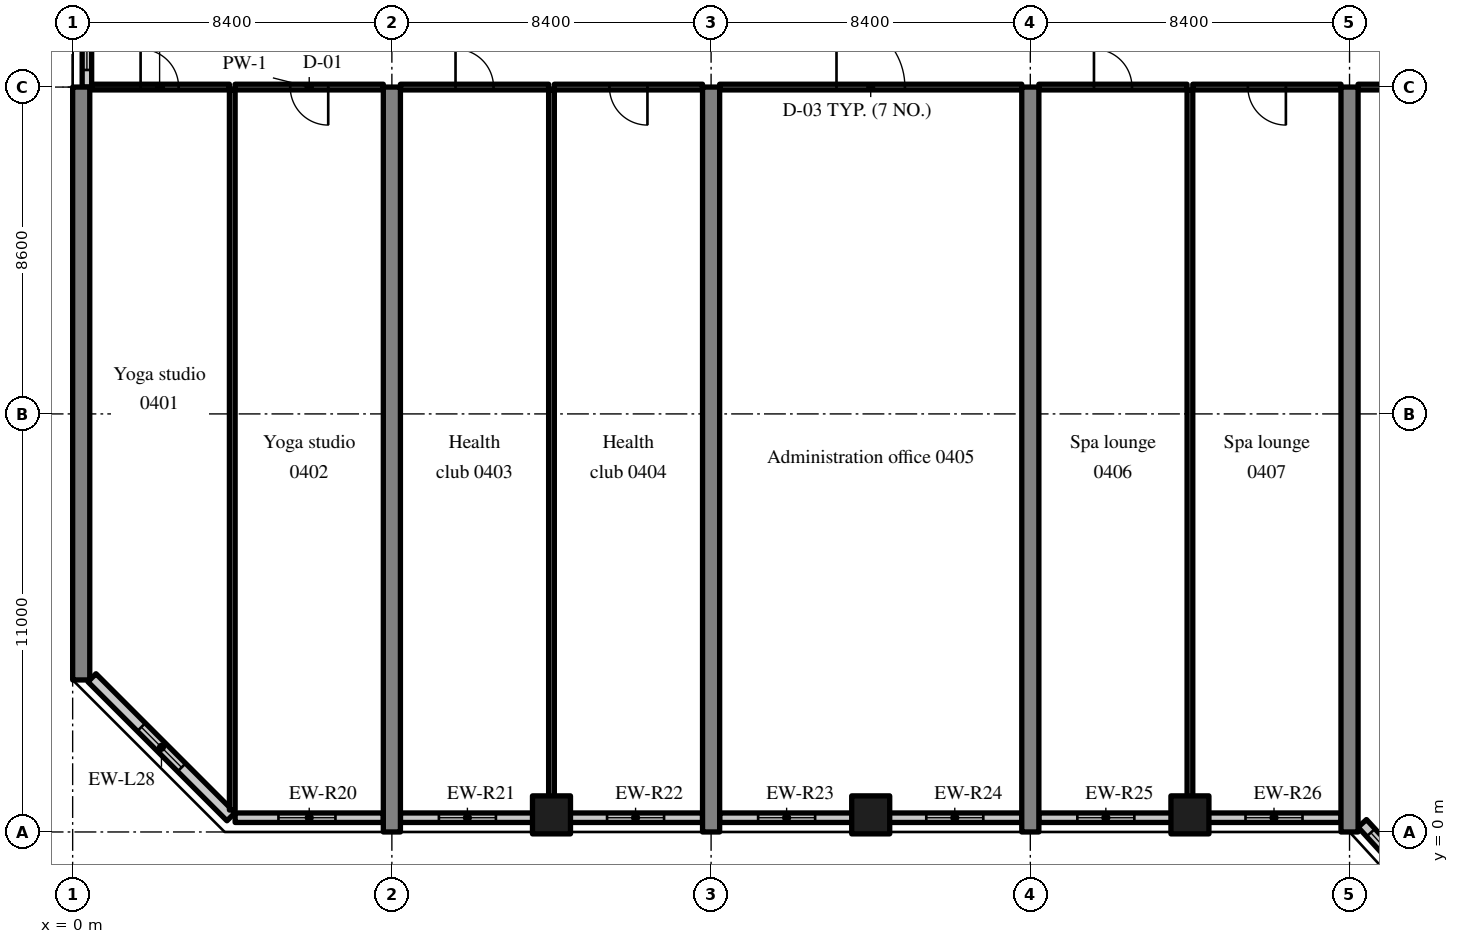
"""IFC4 building model, lengths in metres.
Left out: names, types, materials, properties, quantities, classifications, styles, units other than length and angle.
Written with IfcOpenShell. Run it as: python <this file> out.ifc"""

import sys

from ifc_helpers import new_model, si_unit, direction, frame, frame_2d, origin, origin_2d, place, context, subcontext, project, spatial, rectangle, extrude, source, transform, mapped, element, fill, save


model = new_model("IFC4")
c1 = context("Model", 3, precision=1e-05, world=origin(), true_north=direction((0.0, 1.0)))
c2 = subcontext(c1, "Body", "Model", "MODEL_VIEW")
j1 = project(units=[si_unit("LENGTHUNIT", "METRE"), si_unit("PLANEANGLEUNIT", "RADIAN")], contexts=[c1])
p1 = place(None, origin())
s1 = spatial("IfcSite", under=j1, at=p1, CompositionType="ELEMENT")
p2 = place(p1, origin())
s2 = spatial("IfcBuilding", under=s1, at=p2, CompositionType="ELEMENT")
p3 = place(p2, frame((0.0, 0.0, 23.0)))
s3 = spatial("IfcBuildingStorey", under=s2, at=p3, CompositionType="ELEMENT", Elevation=23.0)
m1 = source(origin(), c2, "Body", "SweptSolid", [
    extrude(rectangle(XDim=15.6, YDim=0.45, at=frame_2d((7.8, 0.0))), origin(), (0.0, 0.0, 1.0), 4.52),
])
p4 = place(p3, frame((0.225, 4.0, 0.0), z_axis=(0.0, 0.0, 1.0), x_axis=(0.0, 1.0, 0.0)))
e1 = element("IfcWall", 1, at=p4, inside=s3, PredefinedType="SHEAR", context=c2, shape_type="MappedRepresentation", body=[
    mapped(m1, transform((0.0, 0.0, 0.0), scale=1.0)),
])
m2 = source(origin(), c2, "Body", "SweptSolid", [
    extrude(rectangle(XDim=19.6, YDim=0.45, at=frame_2d((9.8, 0.0))), origin(), (0.0, 0.0, 1.0), 4.52),
])
for number, where, z_axis, x_axis in (
    (2, (8.4, 0.0, 0.0), (0.0, 0.0, 1.0), (0.0, 1.0, 0.0)),
    (3, (16.8, 0.0, 0.0), (0.0, 0.0, 1.0), (0.0, 1.0, 0.0)),
    (4, (25.2, 0.0, 0.0), (0.0, 0.0, 1.0), (0.0, 1.0, 0.0)),
    (5, (33.6, 0.0, 0.0), (0.0, 0.0, 1.0), (0.0, 1.0, 0.0)),
):
    element("IfcWall", number, at=place(p3, frame(where, z_axis=z_axis, x_axis=x_axis)), inside=s3, PredefinedType="SHEAR", context=c2, shape_type="MappedRepresentation", body=[
        mapped(m2, transform((0.0, 0.0, 0.0), scale=1.0)),
    ])
m3 = source(origin(), c2, "Body", "SweptSolid", [
    extrude(rectangle(XDim=1.0, YDim=1.0, at=origin_2d()), origin(), (0.0, 0.0, 1.0), 4.52),
])
for number, where, z_axis, x_axis in (
    (6, (12.6, 0.45, 0.0), (0.0, 0.0, 1.0), (1.0, 0.0, 0.0)),
    (7, (21.0, 0.45, 0.0), (0.0, 0.0, 1.0), (1.0, 0.0, 0.0)),
    (8, (29.4, 0.45, 0.0), (0.0, 0.0, 1.0), (1.0, 0.0, 0.0)),
):
    element("IfcColumn", number, at=place(p3, frame(where, z_axis=z_axis, x_axis=x_axis)), inside=s3, PredefinedType="COLUMN", context=c2, shape_type="MappedRepresentation", body=[
        mapped(m3, transform((0.0, 0.0, 0.0), scale=1.0)),
    ])
m4 = source(origin(), c2, "Body", "SweptSolid", [
    extrude(rectangle(XDim=2.4, YDim=0.25, at=frame_2d((1.2, 0.0))), origin(), (0.0, 0.0, 1.0), 3.62),
])
p5 = place(p3, frame((0.375, 22.0, 0.0), z_axis=(0.0, 0.0, 1.0), x_axis=(0.0, -1.0, 0.0)))
e9 = element("IfcWall", 9, at=p5, inside=s3, PredefinedType="SOLIDWALL", context=c2, shape_type="MappedRepresentation", body=[
    mapped(m4, transform((0.0, 0.0, 0.0), scale=1.0)),
])
m5 = source(origin(), c2, "Body", "SweptSolid", [
    extrude(rectangle(XDim=1.5, YDim=1.5, at=frame_2d((0.75, 0.75))), frame((0.0, 0.135, 0.0), z_axis=(0.0, -1.0, 0.0), x_axis=(1.0, 0.0, 0.0)), (0.0, 0.0, 1.0), 0.27),
])
p6 = place(p5, frame((0.45, 0.0, 0.9)))
e10 = element("IfcOpeningElement", 10, at=p6, cuts=e9, PredefinedType="OPENING", context=c2, shape_type="MappedRepresentation", body=[
    mapped(m5, transform((0.0, 0.0, 0.0), scale=1.0)),
])
m6 = source(origin(), c2, "Body", "SweptSolid", [
    extrude(rectangle(XDim=5.173, YDim=0.3, at=frame_2d((2.586, 0.0))), origin(), (0.0, 0.0, 1.0), 3.77),
])
p7 = place(p3, frame((0.508, 4.058, 0.0), z_axis=(0.0, 0.0, 1.0), x_axis=(0.707106781187, -0.707106781187, 0.0)))
e11 = element("IfcWall", 11, at=p7, inside=s3, PredefinedType="SOLIDWALL", context=c2, shape_type="MappedRepresentation", body=[
    mapped(m6, transform((0.0, 0.0, 0.0), scale=1.0)),
])
m7 = source(origin(), c2, "Body", "SweptSolid", [
    extrude(rectangle(XDim=1.5, YDim=1.5, at=frame_2d((0.75, 0.75))), frame((0.0, 0.16, 0.0), z_axis=(0.0, -1.0, 0.0), x_axis=(1.0, 0.0, 0.0)), (0.0, 0.0, 1.0), 0.32),
])
p8 = place(p7, frame((1.836, 0.0, 0.9)))
e12 = element("IfcOpeningElement", 12, at=p8, cuts=e11, PredefinedType="OPENING", context=c2, shape_type="MappedRepresentation", body=[
    mapped(m7, transform((0.0, 0.0, 0.0), scale=1.0)),
])
m8 = source(origin(), c2, "Body", "SweptSolid", [
    extrude(rectangle(XDim=3.9, YDim=0.25, at=frame_2d((1.95, 0.0))), origin(), (0.0, 0.0, 1.0), 3.77),
])
p9 = place(p3, frame((4.275, 0.375, 0.0), z_axis=(0.0, 0.0, 1.0), x_axis=(1.0, 0.0, 0.0)))
e13 = element("IfcWall", 13, at=p9, inside=s3, PredefinedType="SOLIDWALL", context=c2, shape_type="MappedRepresentation", body=[
    mapped(m8, transform((0.0, 0.0, 0.0), scale=1.0)),
])
p10 = place(p9, frame((1.14, 0.0, 0.9)))
e14 = element("IfcOpeningElement", 14, at=p10, cuts=e13, PredefinedType="OPENING", context=c2, shape_type="MappedRepresentation", body=[
    mapped(m5, transform((0.0, 0.0, 0.0), scale=1.0)),
])
m9 = source(origin(), c2, "Body", "SweptSolid", [
    extrude(rectangle(XDim=3.525, YDim=0.25, at=frame_2d((1.762, 0.0))), origin(), (0.0, 0.0, 1.0), 3.77),
])
p11 = place(p3, frame((8.625, 0.375, 0.0), z_axis=(0.0, 0.0, 1.0), x_axis=(1.0, 0.0, 0.0)))
e15 = element("IfcWall", 15, at=p11, inside=s3, PredefinedType="SOLIDWALL", context=c2, shape_type="MappedRepresentation", body=[
    mapped(m9, transform((0.0, 0.0, 0.0), scale=1.0)),
])
p12 = place(p11, frame((1.012, 0.0, 0.9)))
e16 = element("IfcOpeningElement", 16, at=p12, cuts=e15, PredefinedType="OPENING", context=c2, shape_type="MappedRepresentation", body=[
    mapped(m5, transform((0.0, 0.0, 0.0), scale=1.0)),
])
p13 = place(p3, frame((13.05, 0.375, 0.0), z_axis=(0.0, 0.0, 1.0), x_axis=(1.0, 0.0, 0.0)))
e17 = element("IfcWall", 17, at=p13, inside=s3, PredefinedType="SOLIDWALL", context=c2, shape_type="MappedRepresentation", body=[
    mapped(m9, transform((0.0, 0.0, 0.0), scale=1.0)),
])
p14 = place(p13, frame((1.012, 0.0, 0.9)))
e18 = element("IfcOpeningElement", 18, at=p14, cuts=e17, PredefinedType="OPENING", context=c2, shape_type="MappedRepresentation", body=[
    mapped(m5, transform((0.0, 0.0, 0.0), scale=1.0)),
])
m10 = source(origin(), c2, "Body", "SweptSolid", [
    extrude(rectangle(XDim=3.525, YDim=0.25, at=frame_2d((1.763, 0.0))), origin(), (0.0, 0.0, 1.0), 3.77),
])
p15 = place(p3, frame((17.025, 0.375, 0.0), z_axis=(0.0, 0.0, 1.0), x_axis=(1.0, 0.0, 0.0)))
e19 = element("IfcWall", 19, at=p15, inside=s3, PredefinedType="SOLIDWALL", context=c2, shape_type="MappedRepresentation", body=[
    mapped(m10, transform((0.0, 0.0, 0.0), scale=1.0)),
])
p16 = place(p15, frame((1.012, 0.0, 0.9)))
e20 = element("IfcOpeningElement", 20, at=p16, cuts=e19, PredefinedType="OPENING", context=c2, shape_type="MappedRepresentation", body=[
    mapped(m5, transform((0.0, 0.0, 0.0), scale=1.0)),
])
p17 = place(p3, frame((21.45, 0.375, 0.0), z_axis=(0.0, 0.0, 1.0), x_axis=(1.0, 0.0, 0.0)))
e21 = element("IfcWall", 21, at=p17, inside=s3, PredefinedType="SOLIDWALL", context=c2, shape_type="MappedRepresentation", body=[
    mapped(m10, transform((0.0, 0.0, 0.0), scale=1.0)),
])
p18 = place(p17, frame((1.012, 0.0, 0.9)))
e22 = element("IfcOpeningElement", 22, at=p18, cuts=e21, PredefinedType="OPENING", context=c2, shape_type="MappedRepresentation", body=[
    mapped(m5, transform((0.0, 0.0, 0.0), scale=1.0)),
])
p19 = place(p3, frame((25.425, 0.375, 0.0), z_axis=(0.0, 0.0, 1.0), x_axis=(1.0, 0.0, 0.0)))
e23 = element("IfcWall", 23, at=p19, inside=s3, PredefinedType="SOLIDWALL", context=c2, shape_type="MappedRepresentation", body=[
    mapped(m9, transform((0.0, 0.0, 0.0), scale=1.0)),
])
p20 = place(p19, frame((1.012, 0.0, 0.9)))
e24 = element("IfcOpeningElement", 24, at=p20, cuts=e23, PredefinedType="OPENING", context=c2, shape_type="MappedRepresentation", body=[
    mapped(m5, transform((0.0, 0.0, 0.0), scale=1.0)),
])
p21 = place(p3, frame((29.85, 0.375, 0.0), z_axis=(0.0, 0.0, 1.0), x_axis=(1.0, 0.0, 0.0)))
e25 = element("IfcWall", 25, at=p21, inside=s3, PredefinedType="SOLIDWALL", context=c2, shape_type="MappedRepresentation", body=[
    mapped(m9, transform((0.0, 0.0, 0.0), scale=1.0)),
])
p22 = place(p21, frame((1.012, 0.0, 0.9)))
e26 = element("IfcOpeningElement", 26, at=p22, cuts=e25, PredefinedType="OPENING", context=c2, shape_type="MappedRepresentation", body=[
    mapped(m5, transform((0.0, 0.0, 0.0), scale=1.0)),
])
m11 = source(origin(), c2, "Body", "SweptSolid", [
    extrude(rectangle(XDim=2.162, YDim=0.3, at=frame_2d((1.081, 0.0))), origin(), (0.0, 0.0, 1.0), 4.52),
])
p23 = place(p3, frame((33.936, 0.226, 0.0), z_axis=(0.0, 0.0, 1.0), x_axis=(0.67537173084, -0.737477474355, 0.0)))
e27 = element("IfcWall", 27, at=p23, inside=s3, PredefinedType="SOLIDWALL", context=c2, shape_type="MappedRepresentation", body=[
    mapped(m11, transform((0.0, 0.0, 0.0), scale=1.0)),
])
m12 = source(origin(), c2, "Body", "SweptSolid", [
    extrude(rectangle(XDim=1.5, YDim=2.0, at=frame_2d((0.75, 1.0))), frame((0.0, 0.16, 0.0), z_axis=(0.0, -1.0, 0.0), x_axis=(1.0, 0.0, 0.0)), (0.0, 0.0, 1.0), 0.32),
])
p24 = place(p23, frame((0.331, 0.0, 0.9)))
e28 = element("IfcOpeningElement", 28, at=p24, cuts=e27, PredefinedType="OPENING", context=c2, shape_type="MappedRepresentation", body=[
    mapped(m12, transform((0.0, 0.0, 0.0), scale=1.0)),
])
m13 = source(origin(), c2, "Body", "SweptSolid", [
    extrude(rectangle(XDim=3.625, YDim=0.15, at=frame_2d((1.812, 0.0))), origin(), (0.0, 0.0, 1.0), 3.82),
])
p25 = place(p3, frame((0.5, 19.6, 0.0), z_axis=(0.0, 0.0, 1.0), x_axis=(1.0, 0.0, 0.0)))
e29 = element("IfcWall", 29, at=p25, inside=s3, PredefinedType="PARTITIONING", context=c2, shape_type="MappedRepresentation", body=[
    mapped(m13, transform((0.0, 0.0, 0.0), scale=1.0)),
])
m14 = source(origin(), c2, "Body", "SweptSolid", [
    extrude(rectangle(XDim=1.0, YDim=2.1, at=frame_2d((0.5, 1.05))), frame((0.0, 0.085, 0.0), z_axis=(0.0, -1.0, 0.0), x_axis=(1.0, 0.0, 0.0)), (0.0, 0.0, 1.0), 0.17),
])
p26 = place(p25, frame((1.288, 0.0, 0.0)))
e30 = element("IfcOpeningElement", 30, at=p26, cuts=e29, PredefinedType="OPENING", context=c2, shape_type="MappedRepresentation", body=[
    mapped(m14, transform((0.0, 0.0, 0.0), scale=1.0)),
])
m15 = source(origin(), c2, "Body", "SweptSolid", [
    extrude(rectangle(XDim=3.9, YDim=0.15, at=frame_2d((1.95, 0.0))), origin(), (0.0, 0.0, 1.0), 3.82),
])
p27 = place(p3, frame((4.275, 19.6, 0.0), z_axis=(0.0, 0.0, 1.0), x_axis=(1.0, 0.0, 0.0)))
e31 = element("IfcWall", 31, at=p27, inside=s3, PredefinedType="PARTITIONING", context=c2, shape_type="MappedRepresentation", body=[
    mapped(m15, transform((0.0, 0.0, 0.0), scale=1.0)),
])
p28 = place(p27, frame((1.45, 0.0, 0.0)))
e32 = element("IfcOpeningElement", 32, at=p28, cuts=e31, PredefinedType="OPENING", context=c2, shape_type="MappedRepresentation", body=[
    mapped(m14, transform((0.0, 0.0, 0.0), scale=1.0)),
])
m16 = source(origin(), c2, "Body", "SweptSolid", [
    extrude(rectangle(XDim=18.947, YDim=0.15, at=frame_2d((9.474, 0.0))), origin(), (0.0, 0.0, 1.0), 4.52),
])
p29 = place(p3, frame((4.2, 0.578, 0.0), z_axis=(0.0, 0.0, 1.0), x_axis=(0.0, 1.0, 0.0)))
e33 = element("IfcWall", 33, at=p29, inside=s3, PredefinedType="PARTITIONING", context=c2, shape_type="MappedRepresentation", body=[
    mapped(m16, transform((0.0, 0.0, 0.0), scale=1.0)),
])
m17 = source(origin(), c2, "Body", "SweptSolid", [
    extrude(rectangle(XDim=3.9, YDim=0.15, at=frame_2d((1.95, 0.0))), origin(), (0.0, 0.0, 1.0), 3.82),
])
p30 = place(p3, frame((8.625, 19.6, 0.0), z_axis=(0.0, 0.0, 1.0), x_axis=(1.0, 0.0, 0.0)))
e34 = element("IfcWall", 34, at=p30, inside=s3, PredefinedType="PARTITIONING", context=c2, shape_type="MappedRepresentation", body=[
    mapped(m17, transform((0.0, 0.0, 0.0), scale=1.0)),
])
p31 = place(p30, frame((1.45, 0.0, 0.0)))
e35 = element("IfcOpeningElement", 35, at=p31, cuts=e34, PredefinedType="OPENING", context=c2, shape_type="MappedRepresentation", body=[
    mapped(m14, transform((0.0, 0.0, 0.0), scale=1.0)),
])
p32 = place(p3, frame((12.675, 19.6, 0.0), z_axis=(0.0, 0.0, 1.0), x_axis=(1.0, 0.0, 0.0)))
e36 = element("IfcWall", 36, at=p32, inside=s3, PredefinedType="PARTITIONING", context=c2, shape_type="MappedRepresentation", body=[
    mapped(m17, transform((0.0, 0.0, 0.0), scale=1.0)),
])
p33 = place(p32, frame((1.45, 0.0, 0.0)))
e37 = element("IfcOpeningElement", 37, at=p33, cuts=e36, PredefinedType="OPENING", context=c2, shape_type="MappedRepresentation", body=[
    mapped(m14, transform((0.0, 0.0, 0.0), scale=1.0)),
])
m18 = source(origin(), c2, "Body", "SweptSolid", [
    extrude(rectangle(XDim=18.625, YDim=0.15, at=frame_2d((9.312, 0.0))), origin(), (0.0, 0.0, 1.0), 4.52),
])
p34 = place(p3, frame((12.6, 0.9, 0.0), z_axis=(0.0, 0.0, 1.0), x_axis=(0.0, 1.0, 0.0)))
e38 = element("IfcWall", 38, at=p34, inside=s3, PredefinedType="PARTITIONING", context=c2, shape_type="MappedRepresentation", body=[
    mapped(m18, transform((0.0, 0.0, 0.0), scale=1.0)),
])
m19 = source(origin(), c2, "Body", "SweptSolid", [
    extrude(rectangle(XDim=7.95, YDim=0.15, at=frame_2d((3.975, 0.0))), origin(), (0.0, 0.0, 1.0), 3.82),
])
p35 = place(p3, frame((17.025, 19.6, 0.0), z_axis=(0.0, 0.0, 1.0), x_axis=(1.0, 0.0, 0.0)))
e39 = element("IfcWall", 39, at=p35, inside=s3, PredefinedType="PARTITIONING", context=c2, shape_type="MappedRepresentation", body=[
    mapped(m19, transform((0.0, 0.0, 0.0), scale=1.0)),
])
m20 = source(origin(), c2, "Body", "SweptSolid", [
    extrude(rectangle(XDim=1.8, YDim=2.1, at=frame_2d((0.9, 1.05))), frame((0.0, 0.085, 0.0), z_axis=(0.0, -1.0, 0.0), x_axis=(1.0, 0.0, 0.0)), (0.0, 0.0, 1.0), 0.17),
])
p36 = place(p35, frame((3.075, 0.0, 0.0)))
e40 = element("IfcOpeningElement", 40, at=p36, cuts=e39, PredefinedType="OPENING", context=c2, shape_type="MappedRepresentation", body=[
    mapped(m20, transform((0.0, 0.0, 0.0), scale=1.0)),
])
p37 = place(p3, frame((25.425, 19.6, 0.0), z_axis=(0.0, 0.0, 1.0), x_axis=(1.0, 0.0, 0.0)))
e41 = element("IfcWall", 41, at=p37, inside=s3, PredefinedType="PARTITIONING", context=c2, shape_type="MappedRepresentation", body=[
    mapped(m17, transform((0.0, 0.0, 0.0), scale=1.0)),
])
p38 = place(p37, frame((1.45, 0.0, 0.0)))
e42 = element("IfcOpeningElement", 42, at=p38, cuts=e41, PredefinedType="OPENING", context=c2, shape_type="MappedRepresentation", body=[
    mapped(m14, transform((0.0, 0.0, 0.0), scale=1.0)),
])
p39 = place(p3, frame((29.475, 19.6, 0.0), z_axis=(0.0, 0.0, 1.0), x_axis=(1.0, 0.0, 0.0)))
e43 = element("IfcWall", 43, at=p39, inside=s3, PredefinedType="PARTITIONING", context=c2, shape_type="MappedRepresentation", body=[
    mapped(m17, transform((0.0, 0.0, 0.0), scale=1.0)),
])
p40 = place(p39, frame((1.45, 0.0, 0.0)))
e44 = element("IfcOpeningElement", 44, at=p40, cuts=e43, PredefinedType="OPENING", context=c2, shape_type="MappedRepresentation", body=[
    mapped(m14, transform((0.0, 0.0, 0.0), scale=1.0)),
])
p41 = place(p3, frame((29.4, 0.9, 0.0), z_axis=(0.0, 0.0, 1.0), x_axis=(0.0, 1.0, 0.0)))
e45 = element("IfcWall", 45, at=p41, inside=s3, PredefinedType="PARTITIONING", context=c2, shape_type="MappedRepresentation", body=[
    mapped(m18, transform((0.0, 0.0, 0.0), scale=1.0)),
])
p42 = place(p3, frame((33.825, 19.6, 0.0), z_axis=(0.0, 0.0, 1.0), x_axis=(1.0, 0.0, 0.0)))
e46 = element("IfcWall", 46, at=p42, inside=s3, PredefinedType="PARTITIONING", context=c2, shape_type="MappedRepresentation", body=[
    mapped(m15, transform((0.0, 0.0, 0.0), scale=1.0)),
])
p43 = place(p42, frame((1.45, 0.0, 0.0)))
e47 = element("IfcOpeningElement", 47, at=p43, cuts=e46, PredefinedType="OPENING", context=c2, shape_type="MappedRepresentation", body=[
    mapped(m14, transform((0.0, 0.0, 0.0), scale=1.0)),
])
m21 = source(origin(), c2, "Body", "SweptSolid", [
    extrude(rectangle(XDim=1.5, YDim=1.5, at=frame_2d((0.75, 0.75))), frame((0.0, 0.03, 0.0), z_axis=(0.0, -1.0, 0.0), x_axis=(1.0, 0.0, 0.0)), (0.0, 0.0, 1.0), 0.06),
])
p44 = place(p6, origin())
e48 = element("IfcWindow", 48, at=p44, inside=s3, PartitioningType="SINGLE_PANEL", PredefinedType="WINDOW", context=c2, shape_type="MappedRepresentation", body=[
    mapped(m21, transform((0.0, 0.0, 0.0), scale=1.0)),
])
fill(e10, e48)
p45 = place(p8, origin())
e49 = element("IfcWindow", 49, at=p45, inside=s3, PartitioningType="SINGLE_PANEL", PredefinedType="WINDOW", context=c2, shape_type="MappedRepresentation", body=[
    mapped(m21, transform((0.0, 0.0, 0.0), scale=1.0)),
])
fill(e12, e49)
p46 = place(p10, origin())
e50 = element("IfcWindow", 50, at=p46, inside=s3, PartitioningType="SINGLE_PANEL", PredefinedType="WINDOW", context=c2, shape_type="MappedRepresentation", body=[
    mapped(m21, transform((0.0, 0.0, 0.0), scale=1.0)),
])
fill(e14, e50)
p47 = place(p12, origin())
e51 = element("IfcWindow", 51, at=p47, inside=s3, PartitioningType="SINGLE_PANEL", PredefinedType="WINDOW", context=c2, shape_type="MappedRepresentation", body=[
    mapped(m21, transform((0.0, 0.0, 0.0), scale=1.0)),
])
fill(e16, e51)
p48 = place(p14, origin())
e52 = element("IfcWindow", 52, at=p48, inside=s3, PartitioningType="SINGLE_PANEL", PredefinedType="WINDOW", context=c2, shape_type="MappedRepresentation", body=[
    mapped(m21, transform((0.0, 0.0, 0.0), scale=1.0)),
])
fill(e18, e52)
p49 = place(p16, origin())
e53 = element("IfcWindow", 53, at=p49, inside=s3, PartitioningType="SINGLE_PANEL", PredefinedType="WINDOW", context=c2, shape_type="MappedRepresentation", body=[
    mapped(m21, transform((0.0, 0.0, 0.0), scale=1.0)),
])
fill(e20, e53)
p50 = place(p18, origin())
e54 = element("IfcWindow", 54, at=p50, inside=s3, PartitioningType="SINGLE_PANEL", PredefinedType="WINDOW", context=c2, shape_type="MappedRepresentation", body=[
    mapped(m21, transform((0.0, 0.0, 0.0), scale=1.0)),
])
fill(e22, e54)
p51 = place(p20, origin())
e55 = element("IfcWindow", 55, at=p51, inside=s3, PartitioningType="SINGLE_PANEL", PredefinedType="WINDOW", context=c2, shape_type="MappedRepresentation", body=[
    mapped(m21, transform((0.0, 0.0, 0.0), scale=1.0)),
])
fill(e24, e55)
p52 = place(p22, origin())
e56 = element("IfcWindow", 56, at=p52, inside=s3, PartitioningType="SINGLE_PANEL", PredefinedType="WINDOW", context=c2, shape_type="MappedRepresentation", body=[
    mapped(m21, transform((0.0, 0.0, 0.0), scale=1.0)),
])
fill(e26, e56)
m22 = source(origin(), c2, "Body", "SweptSolid", [
    extrude(rectangle(XDim=1.5, YDim=2.0, at=frame_2d((0.75, 1.0))), frame((0.0, 0.03, 0.0), z_axis=(0.0, -1.0, 0.0), x_axis=(1.0, 0.0, 0.0)), (0.0, 0.0, 1.0), 0.06),
])
p53 = place(p24, origin())
e57 = element("IfcWindow", 57, at=p53, inside=s3, PartitioningType="SINGLE_PANEL", PredefinedType="WINDOW", context=c2, shape_type="MappedRepresentation", body=[
    mapped(m22, transform((0.0, 0.0, 0.0), scale=1.0)),
])
fill(e28, e57)
m23 = source(origin(), c2, "Body", "SweptSolid", [
    extrude(rectangle(XDim=1.0, YDim=2.1, at=frame_2d((0.5, 1.05))), frame((0.0, 0.025, 0.0), z_axis=(0.0, -1.0, 0.0), x_axis=(1.0, 0.0, 0.0)), (0.0, 0.0, 1.0), 0.05),
])
p54 = place(p26, origin())
e58 = element("IfcDoor", 58, at=p54, inside=s3, OperationType="SINGLE_SWING_LEFT", PredefinedType="DOOR", context=c2, shape_type="MappedRepresentation", body=[
    mapped(m23, transform((0.0, 0.0, 0.0), scale=1.0)),
])
fill(e30, e58)
p55 = place(p28, origin())
e59 = element("IfcDoor", 59, at=p55, inside=s3, OperationType="SINGLE_SWING_RIGHT", PredefinedType="DOOR", context=c2, shape_type="MappedRepresentation", body=[
    mapped(m23, transform((0.0, 0.0, 0.0), scale=1.0)),
])
fill(e32, e59)
p56 = place(p31, origin())
e60 = element("IfcDoor", 60, at=p56, inside=s3, OperationType="SINGLE_SWING_LEFT", PredefinedType="DOOR", context=c2, shape_type="MappedRepresentation", body=[
    mapped(m23, transform((0.0, 0.0, 0.0), scale=1.0)),
])
fill(e35, e60)
p57 = place(p33, origin())
e61 = element("IfcDoor", 61, at=p57, inside=s3, OperationType="SINGLE_SWING_RIGHT", PredefinedType="DOOR", context=c2, shape_type="MappedRepresentation", body=[
    mapped(m23, transform((0.0, 0.0, 0.0), scale=1.0)),
])
fill(e37, e61)
m24 = source(origin(), c2, "Body", "SweptSolid", [
    extrude(rectangle(XDim=1.8, YDim=2.1, at=frame_2d((0.9, 1.05))), frame((0.0, 0.025, 0.0), z_axis=(0.0, -1.0, 0.0), x_axis=(1.0, 0.0, 0.0)), (0.0, 0.0, 1.0), 0.05),
])
p58 = place(p36, origin())
e62 = element("IfcDoor", 62, at=p58, inside=s3, OperationType="DOUBLE_DOOR_SINGLE_SWING", PredefinedType="DOOR", context=c2, shape_type="MappedRepresentation", body=[
    mapped(m24, transform((0.0, 0.0, 0.0), scale=1.0)),
])
fill(e40, e62)
p59 = place(p38, origin())
e63 = element("IfcDoor", 63, at=p59, inside=s3, OperationType="SINGLE_SWING_LEFT", PredefinedType="DOOR", context=c2, shape_type="MappedRepresentation", body=[
    mapped(m23, transform((0.0, 0.0, 0.0), scale=1.0)),
])
fill(e42, e63)
p60 = place(p40, origin())
e64 = element("IfcDoor", 64, at=p60, inside=s3, OperationType="SINGLE_SWING_RIGHT", PredefinedType="DOOR", context=c2, shape_type="MappedRepresentation", body=[
    mapped(m23, transform((0.0, 0.0, 0.0), scale=1.0)),
])
fill(e44, e64)
save(model, sys.argv[1])
